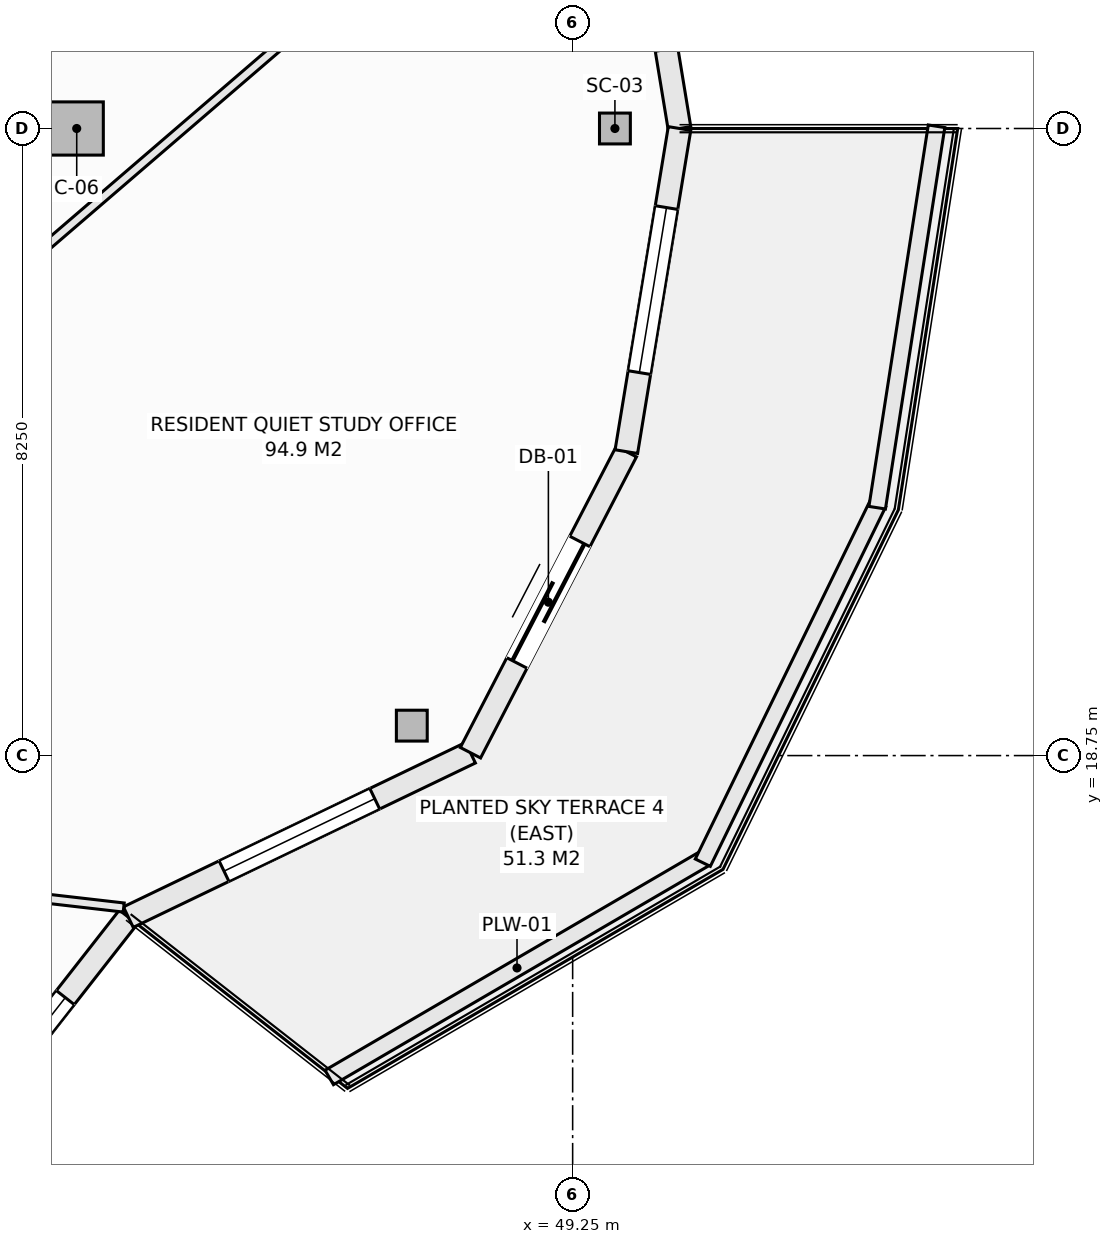
"""IFC4 building model, lengths in metres.
Left out: names, types, materials, properties, quantities, classifications, styles, units other than length and angle.
Written with IfcOpenShell. Run it as: python <this file> out.ifc"""

import sys

from ifc_helpers import new_model, si_unit, direction, frame, frame_2d, origin, origin_2d, place, context, subcontext, project, spatial, rectangle, hollow_rectangle, extrude, element, fill, save


model = new_model("IFC4")
c1 = context("Model", 3, precision=1e-05, world=origin(), true_north=direction((0.0, 1.0)))
c2 = subcontext(c1, "Body", "Model", "MODEL_VIEW")
j1 = project(units=[si_unit("LENGTHUNIT", "METRE"), si_unit("PLANEANGLEUNIT", "RADIAN")], contexts=[c1])
p1 = place(None, origin())
s1 = spatial("IfcSite", under=j1, at=p1, CompositionType="ELEMENT")
p2 = place(p1, origin())
s2 = spatial("IfcBuilding", under=s1, at=p2, CompositionType="ELEMENT")
p3 = place(p2, frame((0.0, 0.0, 262.4)))
s3 = spatial("IfcBuildingStorey", under=s2, at=p3, CompositionType="ELEMENT", Elevation=262.4)
for number, where, z_axis, x_axis in (
    (1, (49.806, 27.0, -0.27), (0.0, 0.0, 1.0), (1.0, 0.0, 0.0)),
    (2, (47.134, 19.144, -0.27), (0.0, 0.0, 1.0), (1.0, 0.0, 0.0)),
):
    element("IfcColumn", number, at=place(p3, frame(where, z_axis=z_axis, x_axis=x_axis)), inside=s3, PredefinedType="COLUMN", context=c2, shape_type="SweptSolid", body=[
        extrude(hollow_rectangle(XDim=0.406, YDim=0.406, WallThickness=0.016, at=origin_2d()), origin(), (0.0, 0.0, 1.0), 3.3),
    ])
p4 = place(p3, frame((42.725, 27.0, -0.27), z_axis=(0.0, 0.0, 1.0), x_axis=(1.0, 0.0, 0.0)))
e3 = element("IfcColumn", 3, at=p4, inside=s3, PredefinedType="COLUMN", context=c2, shape_type="SweptSolid", body=[
    extrude(rectangle(XDim=0.7, YDim=0.7, at=origin_2d()), origin(), (0.0, 0.0, 1.0), 3.3),
])
p5 = place(p3, frame((49.957, 31.251, 0.0), z_axis=(0.0, 0.0, 1.0), x_axis=(0.162404622434, -0.98672424649, 0.0)))
e4 = element("IfcWall", 4, at=p5, inside=s3, PredefinedType="SOLIDWALL", context=c2, shape_type="SweptSolid", body=[
    extrude(rectangle(XDim=4.308, YDim=0.3, at=frame_2d((2.154, 0.0))), origin(), (0.0, 0.0, 1.0), 2.605),
])
p6 = place(p5, frame((1.054, 0.0, 0.72)))
e5 = element("IfcOpeningElement", 5, at=p6, cuts=e4, PredefinedType="OPENING", context=c2, shape_type="SweptSolid", body=[
    extrude(rectangle(XDim=2.2, YDim=1.65, at=frame_2d((1.1, 0.825))), frame((0.0, 0.16, 0.0), z_axis=(0.0, -1.0, 0.0), x_axis=(1.0, 0.0, 0.0)), (0.0, 0.0, 1.0), 0.32),
])
p7 = place(p3, frame((40.391, 12.775, 0.0), z_axis=(0.0, 0.0, 1.0), x_axis=(0.616413297421, 0.78742278781, 0.0)))
e6 = element("IfcWall", 6, at=p7, inside=s3, PredefinedType="SOLIDWALL", context=c2, shape_type="SweptSolid", body=[
    extrude(rectangle(XDim=4.888, YDim=0.3, at=frame_2d((2.444, 0.0))), origin(), (0.0, 0.0, 1.0), 2.605),
])
p8 = place(p7, frame((1.344, 0.0, 0.72)))
e7 = element("IfcOpeningElement", 7, at=p8, cuts=e6, PredefinedType="OPENING", context=c2, shape_type="SweptSolid", body=[
    extrude(rectangle(XDim=2.2, YDim=1.65, at=frame_2d((1.1, 0.825))), frame((0.0, 0.16, 0.0), z_axis=(0.0, -1.0, 0.0), x_axis=(1.0, 0.0, 0.0)), (0.0, 0.0, 1.0), 0.32),
])
p9 = place(p3, frame((43.404, 16.625, 0.0), z_axis=(0.0, 0.0, 1.0), x_axis=(0.901346013132, 0.433099716706, 0.0)))
e8 = element("IfcWall", 8, at=p9, inside=s3, PredefinedType="SOLIDWALL", context=c2, shape_type="SweptSolid", body=[
    extrude(rectangle(XDim=4.994, YDim=0.3, at=frame_2d((2.497, 0.0))), origin(), (0.0, 0.0, 1.0), 2.605),
])
p10 = place(p9, frame((1.397, 0.0, 0.72)))
e9 = element("IfcOpeningElement", 9, at=p10, cuts=e8, PredefinedType="OPENING", context=c2, shape_type="SweptSolid", body=[
    extrude(rectangle(XDim=2.2, YDim=1.65, at=frame_2d((1.1, 0.825))), frame((0.0, 0.16, 0.0), z_axis=(0.0, -1.0, 0.0), x_axis=(1.0, 0.0, 0.0)), (0.0, 0.0, 1.0), 0.32),
])
p11 = place(p3, frame((47.906, 18.788, 0.0), z_axis=(0.0, 0.0, 1.0), x_axis=(0.459801070243, 0.888021945564, 0.0)))
e10 = element("IfcWall", 10, at=p11, inside=s3, PredefinedType="SOLIDWALL", context=c2, shape_type="SweptSolid", body=[
    extrude(rectangle(XDim=4.461, YDim=0.3, at=frame_2d((2.23, 0.0))), origin(), (0.0, 0.0, 1.0), 2.605),
])
p12 = place(p11, frame((1.33, 0.0, 0.0)))
e11 = element("IfcOpeningElement", 11, at=p12, cuts=e10, PredefinedType="OPENING", context=c2, shape_type="SweptSolid", body=[
    extrude(rectangle(XDim=1.8, YDim=2.25, at=frame_2d((0.9, 1.125))), frame((0.0, 0.16, 0.0), z_axis=(0.0, -1.0, 0.0), x_axis=(1.0, 0.0, 0.0)), (0.0, 0.0, 1.0), 0.32),
])
p13 = place(p3, frame((49.957, 22.749, 0.0), z_axis=(0.0, 0.0, 1.0), x_axis=(0.162404622434, 0.98672424649, 0.0)))
e12 = element("IfcWall", 12, at=p13, inside=s3, PredefinedType="SOLIDWALL", context=c2, shape_type="SweptSolid", body=[
    extrude(rectangle(XDim=4.308, YDim=0.3, at=frame_2d((2.154, 0.0))), origin(), (0.0, 0.0, 1.0), 2.605),
])
p14 = place(p13, frame((1.054, 0.0, 0.72)))
e13 = element("IfcOpeningElement", 13, at=p14, cuts=e12, PredefinedType="OPENING", context=c2, shape_type="SweptSolid", body=[
    extrude(rectangle(XDim=2.2, YDim=1.65, at=frame_2d((1.1, 0.825))), frame((0.0, 0.16, 0.0), z_axis=(0.0, -1.0, 0.0), x_axis=(1.0, 0.0, 0.0)), (0.0, 0.0, 1.0), 0.32),
])
p15 = place(p3, frame((46.048, 14.515, 0.0), z_axis=(0.0, 0.0, 1.0), x_axis=(0.863803671285, 0.503828559606, 0.0)))
e14 = element("IfcWall", 14, at=p15, inside=s3, PredefinedType="PARAPET", context=c2, shape_type="SweptSolid", body=[
    extrude(rectangle(XDim=5.719, YDim=0.22, at=frame_2d((2.86, 0.0))), origin(), (0.0, 0.0, 1.0), 0.52),
])
p16 = place(p3, frame((50.962, 17.341, 0.0), z_axis=(0.0, 0.0, 1.0), x_axis=(0.438469339137, 0.898746148051, 0.0)))
e15 = element("IfcWall", 15, at=p16, inside=s3, PredefinedType="PARAPET", context=c2, shape_type="SweptSolid", body=[
    extrude(rectangle(XDim=5.262, YDim=0.22, at=frame_2d((2.631, 0.0))), origin(), (0.0, 0.0, 1.0), 0.52),
])
p17 = place(p3, frame((53.257, 22.011, 0.0), z_axis=(0.0, 0.0, 1.0), x_axis=(0.15374038442, 0.988111276223, 0.0)))
e16 = element("IfcWall", 16, at=p17, inside=s3, PredefinedType="PARAPET", context=c2, shape_type="SweptSolid", body=[
    extrude(rectangle(XDim=5.078, YDim=0.22, at=frame_2d((2.539, 0.0))), origin(), (0.0, 0.0, 1.0), 0.52),
])
p18 = place(p3, frame((41.582, 24.814, 0.0), z_axis=(0.0, 0.0, 1.0), x_axis=(0.758204685581, 0.652016606202, 0.0)))
e17 = element("IfcWall", 17, at=p18, inside=s3, PredefinedType="PARTITIONING", context=c2, shape_type="SweptSolid", body=[
    extrude(rectangle(XDim=10.528, YDim=0.12, at=frame_2d((5.264, 0.0))), origin(), (0.0, 0.0, 1.0), 2.478),
])
p19 = place(p3, frame((36.972, 17.483, 0.0), z_axis=(0.0, 0.0, 1.0), x_axis=(0.993465006101, -0.114137117773, 0.0)))
e18 = element("IfcWall", 18, at=p19, inside=s3, PredefinedType="PARTITIONING", context=c2, shape_type="SweptSolid", body=[
    extrude(rectangle(XDim=6.413, YDim=0.12, at=frame_2d((3.207, 0.0))), origin(), (0.0, 0.0, 1.0), 2.77),
])
p20 = place(p8, origin())
e19 = element("IfcWindow", 19, at=p20, inside=s3, PartitioningType="SINGLE_PANEL", PredefinedType="WINDOW", context=c2, shape_type="SweptSolid", body=[
    extrude(rectangle(XDim=2.2, YDim=1.65, at=frame_2d((1.1, 0.825))), frame((0.0, 0.03, 0.0), z_axis=(0.0, -1.0, 0.0), x_axis=(1.0, 0.0, 0.0)), (0.0, 0.0, 1.0), 0.06),
])
fill(e7, e19)
p21 = place(p10, origin())
e20 = element("IfcWindow", 20, at=p21, inside=s3, PartitioningType="SINGLE_PANEL", PredefinedType="WINDOW", context=c2, shape_type="SweptSolid", body=[
    extrude(rectangle(XDim=2.2, YDim=1.65, at=frame_2d((1.1, 0.825))), frame((0.0, 0.03, 0.0), z_axis=(0.0, -1.0, 0.0), x_axis=(1.0, 0.0, 0.0)), (0.0, 0.0, 1.0), 0.06),
])
fill(e9, e20)
p22 = place(p12, frame((1.8, 0.0, 0.0), z_axis=(0.0, 0.0, 1.0), x_axis=(-1.0, 0.0, 0.0)))
e21 = element("IfcDoor", 21, at=p22, inside=s3, OperationType="SLIDING_TO_LEFT", PredefinedType="DOOR", context=c2, shape_type="SweptSolid", body=[
    extrude(rectangle(XDim=1.8, YDim=2.25, at=frame_2d((0.9, 1.125))), frame((0.0, 0.025, 0.0), z_axis=(0.0, -1.0, 0.0), x_axis=(1.0, 0.0, 0.0)), (0.0, 0.0, 1.0), 0.05),
])
fill(e11, e21)
p23 = place(p14, origin())
e22 = element("IfcWindow", 22, at=p23, inside=s3, PartitioningType="SINGLE_PANEL", PredefinedType="WINDOW", context=c2, shape_type="SweptSolid", body=[
    extrude(rectangle(XDim=2.2, YDim=1.65, at=frame_2d((1.1, 0.825))), frame((0.0, 0.03, 0.0), z_axis=(0.0, -1.0, 0.0), x_axis=(1.0, 0.0, 0.0)), (0.0, 0.0, 1.0), 0.06),
])
fill(e13, e22)
save(model, sys.argv[1])
